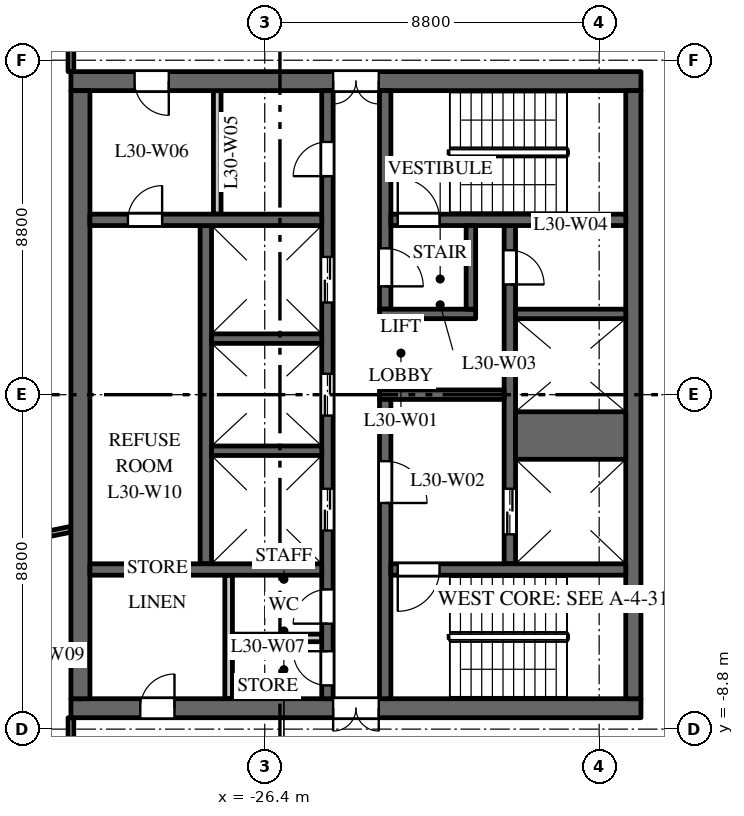
"""IFC4 building model, lengths in metres.
Left out: names, types, materials, properties, quantities, classifications, styles, units other than length and angle.
Written with IfcOpenShell. Run it as: python <this file> out.ifc"""

import sys

from ifc_helpers import new_model, si_unit, direction, frame, frame_2d, origin, place, context, subcontext, project, spatial, rectangle, extrude, element, fill, save


model = new_model("IFC4")
c1 = context("Model", 3, precision=1e-05, world=origin(), true_north=direction((0.0, 1.0)))
c2 = subcontext(c1, "Body", "Model", "MODEL_VIEW")
j1 = project(units=[si_unit("LENGTHUNIT", "METRE"), si_unit("PLANEANGLEUNIT", "RADIAN")], contexts=[c1])
p1 = place(None, origin())
s1 = spatial("IfcSite", under=j1, at=p1, CompositionType="ELEMENT")
p2 = place(p1, origin())
s2 = spatial("IfcBuilding", under=s1, at=p2, CompositionType="ELEMENT")
p3 = place(p2, frame((0.0, 0.0, 132.0)))
s3 = spatial("IfcBuildingStorey", under=s2, at=p3, CompositionType="ELEMENT", Elevation=132.0)
p4 = place(p3, frame((-16.5, 8.25, 0.0), z_axis=(0.0, 0.0, 1.0), x_axis=(-1.0, 0.0, 0.0)))
e1 = element("IfcWall", 1, at=p4, inside=s3, PredefinedType="SHEAR", context=c2, shape_type="SweptSolid", body=[
    extrude(rectangle(XDim=15.0, YDim=0.5, at=frame_2d((7.5, 0.0))), origin(), (0.0, 0.0, 1.0), 3.7),
])
p5 = place(p4, frame((6.9, 0.0, 0.0)))
e2 = element("IfcOpeningElement", 2, at=p5, cuts=e1, PredefinedType="OPENING", context=c2, shape_type="SweptSolid", body=[
    extrude(rectangle(XDim=1.2, YDim=2.1, at=frame_2d((0.6, 1.05))), frame((0.0, 0.26, 0.0), z_axis=(0.0, -1.0, 0.0), x_axis=(1.0, 0.0, 0.0)), (0.0, 0.0, 1.0), 0.52),
])
p6 = place(p4, frame((12.425, 0.0, 0.0)))
e3 = element("IfcOpeningElement", 3, at=p6, cuts=e1, PredefinedType="OPENING", context=c2, shape_type="SweptSolid", body=[
    extrude(rectangle(XDim=0.9, YDim=2.1, at=frame_2d((0.45, 1.05))), frame((0.0, 0.26, 0.0), z_axis=(0.0, -1.0, 0.0), x_axis=(1.0, 0.0, 0.0)), (0.0, 0.0, 1.0), 0.52),
])
p7 = place(p3, frame((-16.5, -8.25, 0.0), z_axis=(0.0, 0.0, 1.0), x_axis=(-1.0, 0.0, 0.0)))
e4 = element("IfcWall", 4, at=p7, inside=s3, PredefinedType="SHEAR", context=c2, shape_type="SweptSolid", body=[
    extrude(rectangle(XDim=15.0, YDim=0.5, at=frame_2d((7.5, 0.0))), origin(), (0.0, 0.0, 1.0), 3.7),
])
p8 = place(p7, frame((6.9, 0.0, 0.0)))
e5 = element("IfcOpeningElement", 5, at=p8, cuts=e4, PredefinedType="OPENING", context=c2, shape_type="SweptSolid", body=[
    extrude(rectangle(XDim=1.2, YDim=2.1, at=frame_2d((0.6, 1.05))), frame((0.0, 0.26, 0.0), z_axis=(0.0, -1.0, 0.0), x_axis=(1.0, 0.0, 0.0)), (0.0, 0.0, 1.0), 0.52),
])
p9 = place(p7, frame((12.275, 0.0, 0.0)))
e6 = element("IfcOpeningElement", 6, at=p9, cuts=e4, PredefinedType="OPENING", context=c2, shape_type="SweptSolid", body=[
    extrude(rectangle(XDim=0.9, YDim=2.1, at=frame_2d((0.45, 1.05))), frame((0.0, 0.26, 0.0), z_axis=(0.0, -1.0, 0.0), x_axis=(1.0, 0.0, 0.0)), (0.0, 0.0, 1.0), 0.52),
])
p10 = place(p3, frame((-27.95, -4.45, 0.0), z_axis=(0.0, 0.0, 1.0), x_axis=(0.0, 1.0, 0.0)))
e7 = element("IfcWall", 7, at=p10, inside=s3, PredefinedType="SHEAR", context=c2, shape_type="SweptSolid", body=[
    extrude(rectangle(XDim=8.9, YDim=0.3, at=frame_2d((4.45, 0.0))), origin(), (0.0, 0.0, 1.0), 3.7),
])
p11 = place(p3, frame((-19.95, -4.45, 0.0), z_axis=(0.0, 0.0, 1.0), x_axis=(0.0, 1.0, 0.0)))
e8 = element("IfcWall", 8, at=p11, inside=s3, PredefinedType="SHEAR", context=c2, shape_type="SweptSolid", body=[
    extrude(rectangle(XDim=8.9, YDim=0.3, at=frame_2d((4.45, 0.0))), origin(), (0.0, 0.0, 1.0), 3.7),
])
p12 = place(p11, frame((0.775, 0.0, 0.0)))
e9 = element("IfcOpeningElement", 9, at=p12, cuts=e8, PredefinedType="OPENING", context=c2, shape_type="SweptSolid", body=[
    extrude(rectangle(XDim=1.2, YDim=2.1, at=frame_2d((0.6, 1.05))), frame((0.0, 0.16, 0.0), z_axis=(0.0, -1.0, 0.0), x_axis=(1.0, 0.0, 0.0)), (0.0, 0.0, 1.0), 0.32),
])
p13 = place(p11, frame((7.35, 0.0, 0.0)))
e10 = element("IfcOpeningElement", 10, at=p13, cuts=e8, PredefinedType="OPENING", context=c2, shape_type="SweptSolid", body=[
    extrude(rectangle(XDim=0.9, YDim=2.1, at=frame_2d((0.45, 1.05))), frame((0.0, 0.16, 0.0), z_axis=(0.0, -1.0, 0.0), x_axis=(1.0, 0.0, 0.0)), (0.0, 0.0, 1.0), 0.32),
])
p14 = place(p3, frame((-24.75, -8.0, 0.0), z_axis=(0.0, 0.0, 1.0), x_axis=(0.0, 1.0, 0.0)))
e11 = element("IfcWall", 11, at=p14, inside=s3, PredefinedType="SHEAR", context=c2, shape_type="SweptSolid", body=[
    extrude(rectangle(XDim=16.0, YDim=0.3, at=frame_2d((8.0, 0.0))), origin(), (0.0, 0.0, 1.0), 3.7),
])
p15 = place(p14, frame((4.425, 0.0, 0.0)))
e12 = element("IfcOpeningElement", 12, at=p15, cuts=e11, PredefinedType="OPENING", context=c2, shape_type="SweptSolid", body=[
    extrude(rectangle(XDim=1.1, YDim=2.1, at=frame_2d((0.55, 1.05))), frame((0.0, 0.16, 0.0), z_axis=(0.0, -1.0, 0.0), x_axis=(1.0, 0.0, 0.0)), (0.0, 0.0, 1.0), 0.32),
])
p16 = place(p14, frame((7.45, 0.0, 0.0)))
e13 = element("IfcOpeningElement", 13, at=p16, cuts=e11, PredefinedType="OPENING", context=c2, shape_type="SweptSolid", body=[
    extrude(rectangle(XDim=1.1, YDim=2.1, at=frame_2d((0.55, 1.05))), frame((0.0, 0.16, 0.0), z_axis=(0.0, -1.0, 0.0), x_axis=(1.0, 0.0, 0.0)), (0.0, 0.0, 1.0), 0.32),
])
p17 = place(p14, frame((10.425, 0.0, 0.0)))
e14 = element("IfcOpeningElement", 14, at=p17, cuts=e11, PredefinedType="OPENING", context=c2, shape_type="SweptSolid", body=[
    extrude(rectangle(XDim=1.2, YDim=2.1, at=frame_2d((0.6, 1.05))), frame((0.0, 0.16, 0.0), z_axis=(0.0, -1.0, 0.0), x_axis=(1.0, 0.0, 0.0)), (0.0, 0.0, 1.0), 0.32),
])
p18 = place(p14, frame((13.75, 0.0, 0.0)))
e15 = element("IfcOpeningElement", 15, at=p18, cuts=e11, PredefinedType="OPENING", context=c2, shape_type="SweptSolid", body=[
    extrude(rectangle(XDim=0.9, YDim=2.1, at=frame_2d((0.45, 1.05))), frame((0.0, 0.16, 0.0), z_axis=(0.0, -1.0, 0.0), x_axis=(1.0, 0.0, 0.0)), (0.0, 0.0, 1.0), 0.32),
])
p19 = place(p14, frame((1.975, 0.0, 0.0)))
e16 = element("IfcOpeningElement", 16, at=p19, cuts=e11, PredefinedType="OPENING", context=c2, shape_type="SweptSolid", body=[
    extrude(rectangle(XDim=0.9, YDim=2.1, at=frame_2d((0.45, 1.05))), frame((0.0, 0.16, 0.0), z_axis=(0.0, -1.0, 0.0), x_axis=(1.0, 0.0, 0.0)), (0.0, 0.0, 1.0), 0.32),
])
p20 = place(p14, frame((0.35, 0.0, 0.0)))
e17 = element("IfcOpeningElement", 17, at=p20, cuts=e11, PredefinedType="OPENING", context=c2, shape_type="SweptSolid", body=[
    extrude(rectangle(XDim=0.9, YDim=2.1, at=frame_2d((0.45, 1.05))), frame((0.0, 0.16, 0.0), z_axis=(0.0, -1.0, 0.0), x_axis=(1.0, 0.0, 0.0)), (0.0, 0.0, 1.0), 0.32),
])
p21 = place(p3, frame((-20.1, 0.0, 0.0), z_axis=(0.0, 0.0, 1.0), x_axis=(-1.0, 0.0, 0.0)))
e18 = element("IfcWall", 18, at=p21, inside=s3, PredefinedType="SHEAR", context=c2, shape_type="SweptSolid", body=[
    extrude(rectangle(XDim=3.28, YDim=0.25, at=frame_2d((1.64, 0.0))), origin(), (0.0, 0.0, 1.0), 3.7),
])
p22 = place(p3, frame((-16.7, -8.0, 0.0), z_axis=(0.0, 0.0, 1.0), x_axis=(0.0, 1.0, 0.0)))
e19 = element("IfcWall", 19, at=p22, inside=s3, PredefinedType="SHEAR", context=c2, shape_type="SweptSolid", body=[
    extrude(rectangle(XDim=16.0, YDim=0.4, at=frame_2d((8.0, 0.0))), origin(), (0.0, 0.0, 1.0), 3.7),
])
p23 = place(p3, frame((-31.25, -8.0, 0.0), z_axis=(0.0, 0.0, 1.0), x_axis=(0.0, 1.0, 0.0)))
e20 = element("IfcWall", 20, at=p23, inside=s3, PredefinedType="SHEAR", context=c2, shape_type="SweptSolid", body=[
    extrude(rectangle(XDim=16.0, YDim=0.5, at=frame_2d((8.0, 0.0))), origin(), (0.0, 0.0, 1.0), 3.7),
])
p24 = place(p3, frame((-24.9, 4.6, 0.0), z_axis=(0.0, 0.0, 1.0), x_axis=(-1.0, 0.0, 0.0)))
e21 = element("IfcWall", 21, at=p24, inside=s3, PredefinedType="SHEAR", context=c2, shape_type="SweptSolid", body=[
    extrude(rectangle(XDim=6.1, YDim=0.3, at=frame_2d((3.05, 0.0))), origin(), (0.0, 0.0, 1.0), 3.7),
])
p25 = place(p24, frame((4.2, 0.0, 0.0)))
e22 = element("IfcOpeningElement", 22, at=p25, cuts=e21, PredefinedType="OPENING", context=c2, shape_type="SweptSolid", body=[
    extrude(rectangle(XDim=0.9, YDim=2.1, at=frame_2d((0.45, 1.05))), frame((0.0, 0.16, 0.0), z_axis=(0.0, -1.0, 0.0), x_axis=(1.0, 0.0, 0.0)), (0.0, 0.0, 1.0), 0.32),
])
for number, where, z_axis, x_axis in (
    (23, (-27.65, 4.75, 0.0), (0.0, 0.0, 1.0), (0.0, 1.0, 0.0)),
    (24, (-27.35, -8.0, 0.0), (0.0, 0.0, 1.0), (0.0, 1.0, 0.0)),
):
    element("IfcWall", number, at=place(p3, frame(where, z_axis=z_axis, x_axis=x_axis)), inside=s3, PredefinedType="PARTITIONING", context=c2, shape_type="SweptSolid", body=[
        extrude(rectangle(XDim=3.25, YDim=0.2, at=frame_2d((1.625, 0.0))), origin(), (0.0, 0.0, 1.0), 3.7),
    ])
p26 = place(p3, frame((-24.9, -6.4, 0.0), z_axis=(0.0, 0.0, 1.0), x_axis=(-1.0, 0.0, 0.0)))
e25 = element("IfcWall", 25, at=p26, inside=s3, PredefinedType="PARTITIONING", context=c2, shape_type="SweptSolid", body=[
    extrude(rectangle(XDim=2.35, YDim=0.2, at=frame_2d((1.175, 0.0))), origin(), (0.0, 0.0, 1.0), 3.7),
])
p27 = place(p3, frame((-24.9, -4.6, 0.0), z_axis=(0.0, 0.0, 1.0), x_axis=(-1.0, 0.0, 0.0)))
e26 = element("IfcWall", 26, at=p27, inside=s3, PredefinedType="SHEAR", context=c2, shape_type="SweptSolid", body=[
    extrude(rectangle(XDim=6.1, YDim=0.3, at=frame_2d((3.05, 0.0))), origin(), (0.0, 0.0, 1.0), 3.7),
])
p28 = place(p3, frame((-16.9, -1.075, 0.0), z_axis=(0.0, 0.0, 1.0), x_axis=(-1.0, 0.0, 0.0)))
e27 = element("IfcWall", 27, at=p28, inside=s3, PredefinedType="SHEAR", context=c2, shape_type="SweptSolid", body=[
    extrude(rectangle(XDim=2.9, YDim=1.25, at=frame_2d((1.45, 0.0))), origin(), (0.0, 0.0, 1.0), 3.7),
])
for number, where, z_axis, x_axis in (
    (28, (-16.9, 2.125, 0.0), (0.0, 0.0, 1.0), (-1.0, 0.0, 0.0)),
    (29, (-24.9, -1.475, 0.0), (0.0, 0.0, 1.0), (-1.0, 0.0, 0.0)),
    (30, (-24.9, 1.475, 0.0), (0.0, 0.0, 1.0), (-1.0, 0.0, 0.0)),
):
    element("IfcWall", number, at=place(p3, frame(where, z_axis=z_axis, x_axis=x_axis)), inside=s3, PredefinedType="SHEAR", context=c2, shape_type="SweptSolid", body=[
        extrude(rectangle(XDim=2.9, YDim=0.25, at=frame_2d((1.45, 0.0))), origin(), (0.0, 0.0, 1.0), 3.7),
    ])
p29 = place(p3, frame((-23.23, 2.25, 0.0), z_axis=(0.0, 0.0, 1.0), x_axis=(0.0, 1.0, 0.0)))
e31 = element("IfcWall", 31, at=p29, inside=s3, PredefinedType="SHEAR", context=c2, shape_type="SweptSolid", body=[
    extrude(rectangle(XDim=5.75, YDim=0.3, at=frame_2d((2.875, 0.0))), origin(), (0.0, 0.0, 1.0), 3.7),
])
p30 = place(p29, frame((0.6, 0.0, 0.0)))
e32 = element("IfcOpeningElement", 32, at=p30, cuts=e31, PredefinedType="OPENING", context=c2, shape_type="SweptSolid", body=[
    extrude(rectangle(XDim=1.0, YDim=2.1, at=frame_2d((0.5, 1.05))), frame((0.0, 0.16, 0.0), z_axis=(0.0, -1.0, 0.0), x_axis=(1.0, 0.0, 0.0)), (0.0, 0.0, 1.0), 0.32),
])
p31 = place(p3, frame((-23.23, -8.0, 0.0), z_axis=(0.0, 0.0, 1.0), x_axis=(0.0, 1.0, 0.0)))
e33 = element("IfcWall", 33, at=p31, inside=s3, PredefinedType="SHEAR", context=c2, shape_type="SweptSolid", body=[
    extrude(rectangle(XDim=7.875, YDim=0.3, at=frame_2d((3.938, 0.0))), origin(), (0.0, 0.0, 1.0), 3.7),
])
p32 = place(p31, frame((5.15, 0.0, 0.0)))
e34 = element("IfcOpeningElement", 34, at=p32, cuts=e33, PredefinedType="OPENING", context=c2, shape_type="SweptSolid", body=[
    extrude(rectangle(XDim=1.1, YDim=2.1, at=frame_2d((0.55, 1.05))), frame((0.0, 0.16, 0.0), z_axis=(0.0, -1.0, 0.0), x_axis=(1.0, 0.0, 0.0)), (0.0, 0.0, 1.0), 0.32),
])
p33 = place(p3, frame((-16.9, 4.6, 0.0), z_axis=(0.0, 0.0, 1.0), x_axis=(-1.0, 0.0, 0.0)))
e35 = element("IfcWall", 35, at=p33, inside=s3, PredefinedType="SHEAR", context=c2, shape_type="SweptSolid", body=[
    extrude(rectangle(XDim=6.18, YDim=0.3, at=frame_2d((3.09, 0.0))), origin(), (0.0, 0.0, 1.0), 3.7),
])
p34 = place(p33, frame((4.9, 0.0, 0.0)))
e36 = element("IfcOpeningElement", 36, at=p34, cuts=e35, PredefinedType="OPENING", context=c2, shape_type="SweptSolid", body=[
    extrude(rectangle(XDim=1.1, YDim=2.1, at=frame_2d((0.55, 1.05))), frame((0.0, 0.16, 0.0), z_axis=(0.0, -1.0, 0.0), x_axis=(1.0, 0.0, 0.0)), (0.0, 0.0, 1.0), 0.32),
])
p35 = place(p3, frame((-16.9, -4.6, 0.0), z_axis=(0.0, 0.0, 1.0), x_axis=(-1.0, 0.0, 0.0)))
e37 = element("IfcWall", 37, at=p35, inside=s3, PredefinedType="SHEAR", context=c2, shape_type="SweptSolid", body=[
    extrude(rectangle(XDim=6.18, YDim=0.3, at=frame_2d((3.09, 0.0))), origin(), (0.0, 0.0, 1.0), 3.7),
])
p36 = place(p35, frame((4.9, 0.0, 0.0)))
e38 = element("IfcOpeningElement", 38, at=p36, cuts=e37, PredefinedType="OPENING", context=c2, shape_type="SweptSolid", body=[
    extrude(rectangle(XDim=1.1, YDim=2.1, at=frame_2d((0.55, 1.05))), frame((0.0, 0.16, 0.0), z_axis=(0.0, -1.0, 0.0), x_axis=(1.0, 0.0, 0.0)), (0.0, 0.0, 1.0), 0.32),
])
p37 = place(p3, frame((-20.85, 2.125, 0.0), z_axis=(0.0, 0.0, 1.0), x_axis=(-1.0, 0.0, 0.0)))
e39 = element("IfcWall", 39, at=p37, inside=s3, PredefinedType="SHEAR", context=c2, shape_type="SweptSolid", body=[
    extrude(rectangle(XDim=2.53, YDim=0.25, at=frame_2d((1.265, 0.0))), origin(), (0.0, 0.0, 1.0), 3.7),
])
p38 = place(p3, frame((-20.975, 2.25, 0.0), z_axis=(0.0, 0.0, 1.0), x_axis=(0.0, 1.0, 0.0)))
e40 = element("IfcWall", 40, at=p38, inside=s3, PredefinedType="SHEAR", context=c2, shape_type="SweptSolid", body=[
    extrude(rectangle(XDim=2.2, YDim=0.25, at=frame_2d((1.1, 0.0))), origin(), (0.0, 0.0, 1.0), 3.7),
])
p39 = place(p3, frame((-35.512, -4.349, 0.0), z_axis=(0.0, 0.0, 1.0), x_axis=(0.980357474535, 0.197228857227, 0.0)))
e41 = element("IfcWall", 41, at=p39, inside=s3, PredefinedType="PARTITIONING", context=c2, shape_type="SweptSolid", body=[
    extrude(rectangle(XDim=4.092, YDim=0.15, at=frame_2d((2.046, 0.0))), origin(), (0.0, 0.0, 1.0), 3.2),
])
for number, where, z_axis, x_axis in (
    (42, (-31.5, -10.7, 0.0), (0.0, 0.0, 1.0), (0.0, 1.0, 0.0)),
    (43, (-31.5, 8.5, 0.0), (0.0, 0.0, 1.0), (0.0, 1.0, 0.0)),
):
    element("IfcWall", number, at=place(p3, frame(where, z_axis=z_axis, x_axis=x_axis)), inside=s3, PredefinedType="PARTITIONING", context=c2, shape_type="SweptSolid", body=[
        extrude(rectangle(XDim=2.2, YDim=0.15, at=frame_2d((1.1, 0.0))), origin(), (0.0, 0.0, 1.0), 3.7),
    ])
p40 = place(p12, origin())
e44 = element("IfcDoor", 44, at=p40, inside=s3, OperationType="DOUBLE_DOOR_SLIDING", PredefinedType="DOOR", context=c2, shape_type="SweptSolid", body=[
    extrude(rectangle(XDim=1.2, YDim=2.1, at=frame_2d((0.6, 1.05))), frame((0.0, 0.025, 0.0), z_axis=(0.0, -1.0, 0.0), x_axis=(1.0, 0.0, 0.0)), (0.0, 0.0, 1.0), 0.05),
])
fill(e9, e44)
p41 = place(p15, origin())
e45 = element("IfcDoor", 45, at=p41, inside=s3, OperationType="DOUBLE_DOOR_SLIDING", PredefinedType="DOOR", context=c2, shape_type="SweptSolid", body=[
    extrude(rectangle(XDim=1.1, YDim=2.1, at=frame_2d((0.55, 1.05))), frame((0.0, 0.025, 0.0), z_axis=(0.0, -1.0, 0.0), x_axis=(1.0, 0.0, 0.0)), (0.0, 0.0, 1.0), 0.05),
])
fill(e12, e45)
p42 = place(p16, origin())
e46 = element("IfcDoor", 46, at=p42, inside=s3, OperationType="DOUBLE_DOOR_SLIDING", PredefinedType="DOOR", context=c2, shape_type="SweptSolid", body=[
    extrude(rectangle(XDim=1.1, YDim=2.1, at=frame_2d((0.55, 1.05))), frame((0.0, 0.025, 0.0), z_axis=(0.0, -1.0, 0.0), x_axis=(1.0, 0.0, 0.0)), (0.0, 0.0, 1.0), 0.05),
])
fill(e13, e46)
p43 = place(p17, origin())
e47 = element("IfcDoor", 47, at=p43, inside=s3, OperationType="DOUBLE_DOOR_SLIDING", PredefinedType="DOOR", context=c2, shape_type="SweptSolid", body=[
    extrude(rectangle(XDim=1.2, YDim=2.1, at=frame_2d((0.6, 1.05))), frame((0.0, 0.025, 0.0), z_axis=(0.0, -1.0, 0.0), x_axis=(1.0, 0.0, 0.0)), (0.0, 0.0, 1.0), 0.05),
])
fill(e14, e47)
p44 = place(p34, origin())
e48 = element("IfcDoor", 48, at=p44, inside=s3, OperationType="SINGLE_SWING_RIGHT", PredefinedType="DOOR", context=c2, shape_type="SweptSolid", body=[
    extrude(rectangle(XDim=1.1, YDim=2.1, at=frame_2d((0.55, 1.05))), frame((0.0, 0.025, 0.0), z_axis=(0.0, -1.0, 0.0), x_axis=(1.0, 0.0, 0.0)), (0.0, 0.0, 1.0), 0.05),
])
fill(e36, e48)
p45 = place(p36, origin())
e49 = element("IfcDoor", 49, at=p45, inside=s3, OperationType="SINGLE_SWING_LEFT", PredefinedType="DOOR", context=c2, shape_type="SweptSolid", body=[
    extrude(rectangle(XDim=1.1, YDim=2.1, at=frame_2d((0.55, 1.05))), frame((0.0, 0.025, 0.0), z_axis=(0.0, -1.0, 0.0), x_axis=(1.0, 0.0, 0.0)), (0.0, 0.0, 1.0), 0.05),
])
fill(e38, e49)
p46 = place(p32, origin())
e50 = element("IfcDoor", 50, at=p46, inside=s3, OperationType="SINGLE_SWING_LEFT", PredefinedType="DOOR", context=c2, shape_type="SweptSolid", body=[
    extrude(rectangle(XDim=1.1, YDim=2.1, at=frame_2d((0.55, 1.05))), frame((0.0, 0.025, 0.0), z_axis=(0.0, -1.0, 0.0), x_axis=(1.0, 0.0, 0.0)), (0.0, 0.0, 1.0), 0.05),
])
fill(e34, e50)
p47 = place(p30, origin())
e51 = element("IfcDoor", 51, at=p47, inside=s3, OperationType="SINGLE_SWING_LEFT", PredefinedType="DOOR", context=c2, shape_type="SweptSolid", body=[
    extrude(rectangle(XDim=1.0, YDim=2.1, at=frame_2d((0.5, 1.05))), frame((0.0, 0.025, 0.0), z_axis=(0.0, -1.0, 0.0), x_axis=(1.0, 0.0, 0.0)), (0.0, 0.0, 1.0), 0.05),
])
fill(e32, e51)
p48 = place(p5, origin())
e52 = element("IfcDoor", 52, at=p48, inside=s3, OperationType="DOUBLE_DOOR_DOUBLE_SWING", PredefinedType="DOOR", context=c2, shape_type="SweptSolid", body=[
    extrude(rectangle(XDim=1.2, YDim=2.1, at=frame_2d((0.6, 1.05))), frame((0.0, 0.025, 0.0), z_axis=(0.0, -1.0, 0.0), x_axis=(1.0, 0.0, 0.0)), (0.0, 0.0, 1.0), 0.05),
])
fill(e2, e52)
p49 = place(p8, origin())
e53 = element("IfcDoor", 53, at=p49, inside=s3, OperationType="DOUBLE_DOOR_DOUBLE_SWING", PredefinedType="DOOR", context=c2, shape_type="SweptSolid", body=[
    extrude(rectangle(XDim=1.2, YDim=2.1, at=frame_2d((0.6, 1.05))), frame((0.0, 0.025, 0.0), z_axis=(0.0, -1.0, 0.0), x_axis=(1.0, 0.0, 0.0)), (0.0, 0.0, 1.0), 0.05),
])
fill(e5, e53)
p50 = place(p13, origin())
e54 = element("IfcDoor", 54, at=p50, inside=s3, OperationType="SINGLE_SWING_LEFT", PredefinedType="DOOR", context=c2, shape_type="SweptSolid", body=[
    extrude(rectangle(XDim=0.9, YDim=2.1, at=frame_2d((0.45, 1.05))), frame((0.0, 0.025, 0.0), z_axis=(0.0, -1.0, 0.0), x_axis=(1.0, 0.0, 0.0)), (0.0, 0.0, 1.0), 0.05),
])
fill(e10, e54)
p51 = place(p18, origin())
e55 = element("IfcDoor", 55, at=p51, inside=s3, OperationType="SINGLE_SWING_RIGHT", PredefinedType="DOOR", context=c2, shape_type="SweptSolid", body=[
    extrude(rectangle(XDim=0.9, YDim=2.1, at=frame_2d((0.45, 1.05))), frame((0.0, 0.025, 0.0), z_axis=(0.0, -1.0, 0.0), x_axis=(1.0, 0.0, 0.0)), (0.0, 0.0, 1.0), 0.05),
])
fill(e15, e55)
p52 = place(p6, origin())
e56 = element("IfcDoor", 56, at=p52, inside=s3, OperationType="SINGLE_SWING_RIGHT", PredefinedType="DOOR", context=c2, shape_type="SweptSolid", body=[
    extrude(rectangle(XDim=0.9, YDim=2.1, at=frame_2d((0.45, 1.05))), frame((0.0, 0.025, 0.0), z_axis=(0.0, -1.0, 0.0), x_axis=(1.0, 0.0, 0.0)), (0.0, 0.0, 1.0), 0.05),
])
fill(e3, e56)
p53 = place(p19, origin())
e57 = element("IfcDoor", 57, at=p53, inside=s3, OperationType="SINGLE_SWING_RIGHT", PredefinedType="DOOR", context=c2, shape_type="SweptSolid", body=[
    extrude(rectangle(XDim=0.9, YDim=2.1, at=frame_2d((0.45, 1.05))), frame((0.0, 0.025, 0.0), z_axis=(0.0, -1.0, 0.0), x_axis=(1.0, 0.0, 0.0)), (0.0, 0.0, 1.0), 0.05),
])
fill(e16, e57)
p54 = place(p20, origin())
e58 = element("IfcDoor", 58, at=p54, inside=s3, OperationType="SINGLE_SWING_LEFT", PredefinedType="DOOR", context=c2, shape_type="SweptSolid", body=[
    extrude(rectangle(XDim=0.9, YDim=2.1, at=frame_2d((0.45, 1.05))), frame((0.0, 0.025, 0.0), z_axis=(0.0, -1.0, 0.0), x_axis=(1.0, 0.0, 0.0)), (0.0, 0.0, 1.0), 0.05),
])
fill(e17, e58)
p55 = place(p9, origin())
e59 = element("IfcDoor", 59, at=p55, inside=s3, OperationType="SINGLE_SWING_LEFT", PredefinedType="DOOR", context=c2, shape_type="SweptSolid", body=[
    extrude(rectangle(XDim=0.9, YDim=2.1, at=frame_2d((0.45, 1.05))), frame((0.0, 0.025, 0.0), z_axis=(0.0, -1.0, 0.0), x_axis=(1.0, 0.0, 0.0)), (0.0, 0.0, 1.0), 0.05),
])
fill(e6, e59)
p56 = place(p25, origin())
e60 = element("IfcDoor", 60, at=p56, inside=s3, OperationType="SINGLE_SWING_LEFT", PredefinedType="DOOR", context=c2, shape_type="SweptSolid", body=[
    extrude(rectangle(XDim=0.9, YDim=2.1, at=frame_2d((0.45, 1.05))), frame((0.0, 0.025, 0.0), z_axis=(0.0, -1.0, 0.0), x_axis=(1.0, 0.0, 0.0)), (0.0, 0.0, 1.0), 0.05),
])
fill(e22, e60)
save(model, sys.argv[1])
